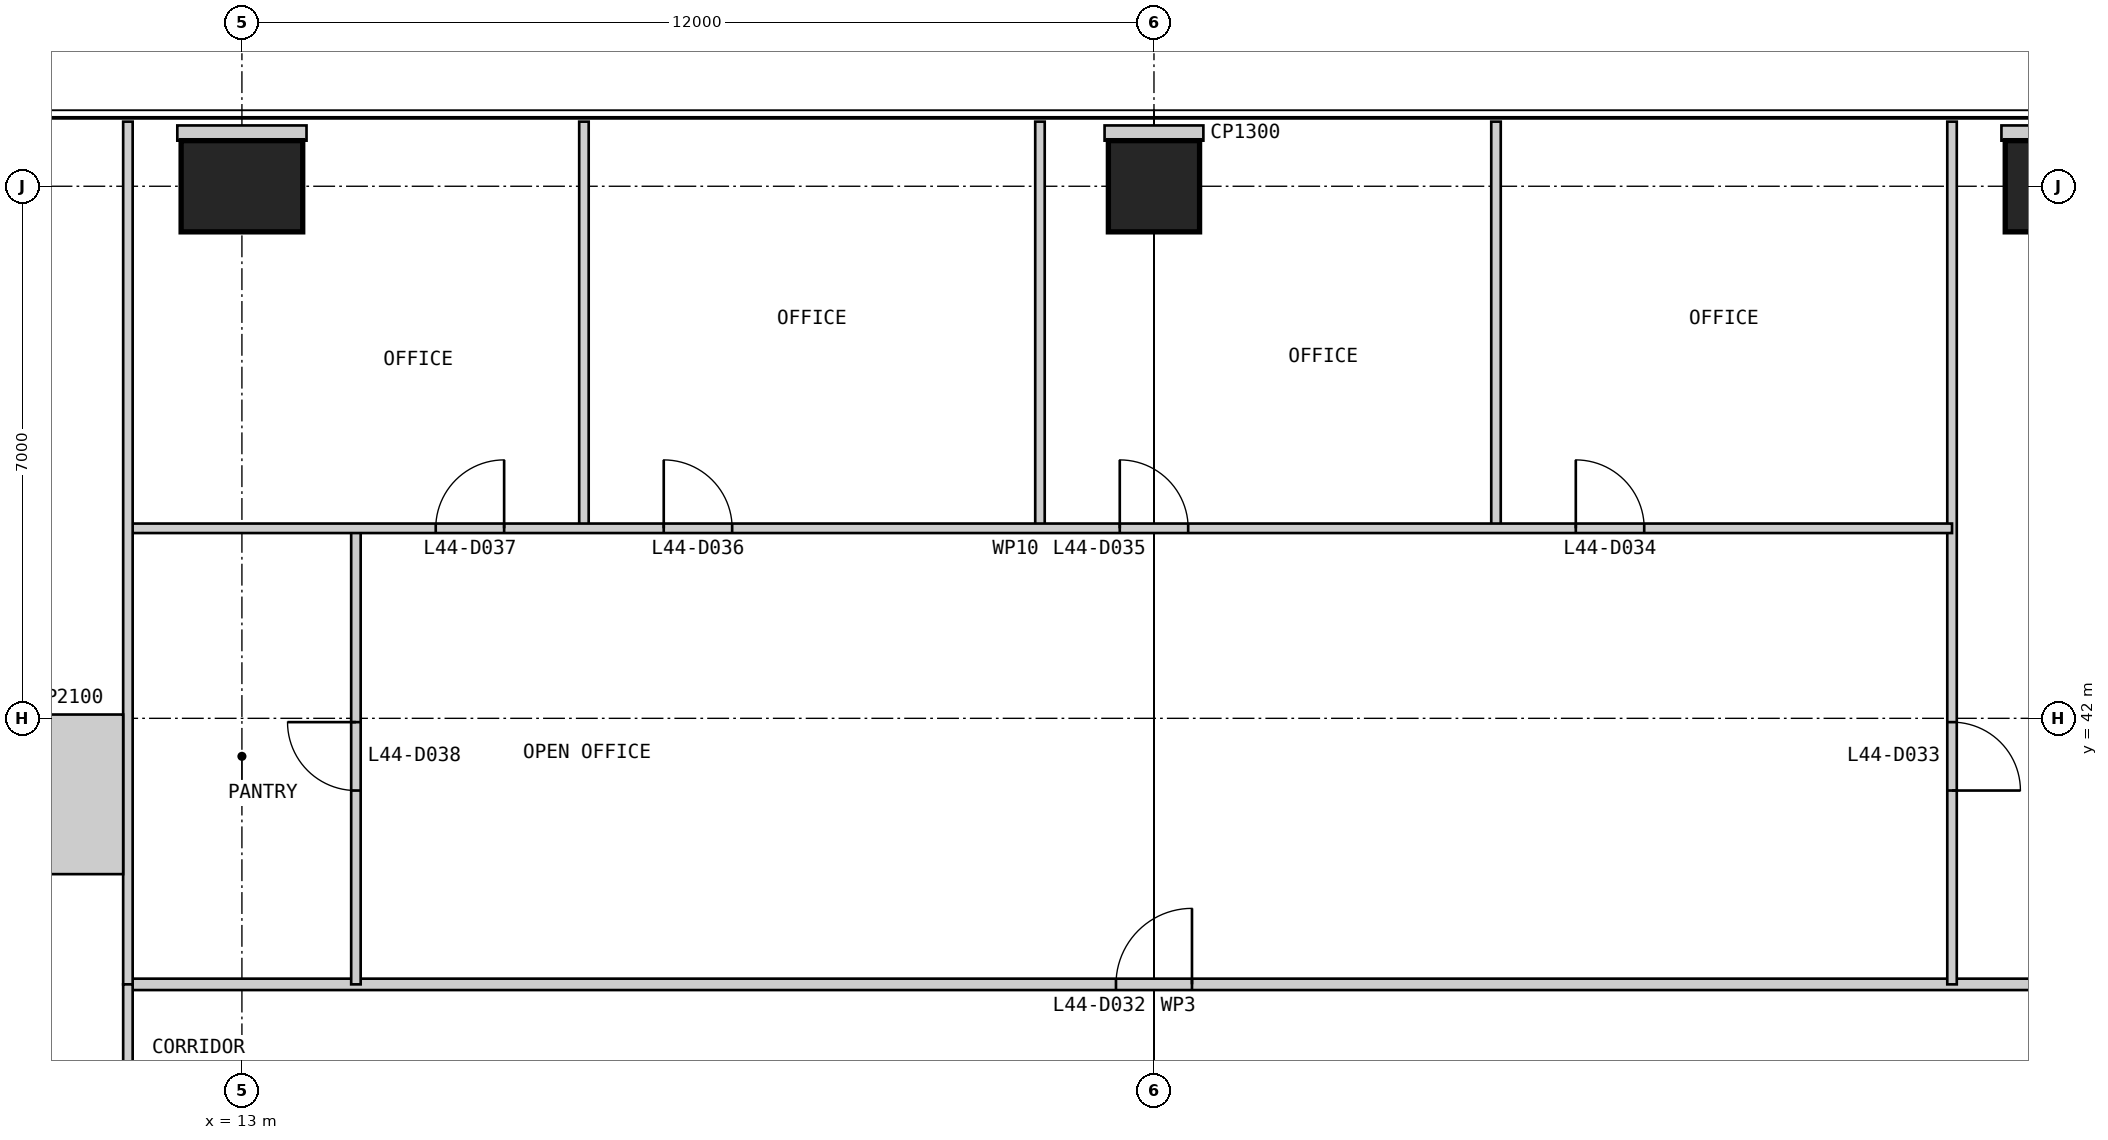
"""IFC4 building model, lengths in metres.
Left out: names, types, materials, properties, quantities, classifications, styles, units other than length and angle.
Written with IfcOpenShell. Run it as: python <this file> out.ifc"""

import sys

from ifc_helpers import new_model, si_unit, direction, frame, frame_2d, origin, origin_2d, place, context, subcontext, project, spatial, rectangle, extrude, element, fill, save


model = new_model("IFC4")
c1 = context("Model", 3, precision=1e-05, world=origin(), true_north=direction((0.0, 1.0)))
c2 = subcontext(c1, "Body", "Model", "MODEL_VIEW")
j1 = project(units=[si_unit("LENGTHUNIT", "METRE"), si_unit("PLANEANGLEUNIT", "RADIAN")], contexts=[c1])
p1 = place(None, origin())
s1 = spatial("IfcSite", under=j1, at=p1, CompositionType="ELEMENT")
p2 = place(p1, origin())
s2 = spatial("IfcBuilding", under=s1, at=p2, CompositionType="ELEMENT")
p3 = place(p2, frame((0.0, 0.0, 189.8)))
s3 = spatial("IfcBuildingStorey", under=s2, at=p3, CompositionType="ELEMENT", Elevation=189.8)
p4 = place(p3, frame((37.0, 49.0, 0.0), z_axis=(0.0, 0.0, 1.0), x_axis=(1.0, 0.0, 0.0)))
e1 = element("IfcColumn", 1, at=p4, inside=s3, PredefinedType="COLUMN", context=c2, shape_type="SweptSolid", body=[
    extrude(rectangle(XDim=1.6, YDim=1.2, at=origin_2d()), origin(), (0.0, 0.0, 1.0), 4.0),
])
p5 = place(p3, frame((25.0, 49.0, 0.0), z_axis=(0.0, 0.0, 1.0), x_axis=(1.0, 0.0, 0.0)))
e2 = element("IfcColumn", 2, at=p5, inside=s3, PredefinedType="COLUMN", context=c2, shape_type="SweptSolid", body=[
    extrude(rectangle(XDim=1.2, YDim=1.2, at=origin_2d()), origin(), (0.0, 0.0, 1.0), 4.0),
])
p6 = place(p3, frame((13.0, 49.0, 0.0), z_axis=(0.0, 0.0, 1.0), x_axis=(1.0, 0.0, 0.0)))
e3 = element("IfcColumn", 3, at=p6, inside=s3, PredefinedType="COLUMN", context=c2, shape_type="SweptSolid", body=[
    extrude(rectangle(XDim=1.6, YDim=1.2, at=origin_2d()), origin(), (0.0, 0.0, 1.0), 4.0),
])
p7 = place(p3, frame((38.5, 38.5, 0.0), z_axis=(0.0, 0.0, 1.0), x_axis=(-1.0, 0.0, 0.0)))
e4 = element("IfcWall", 4, at=p7, inside=s3, PredefinedType="PARTITIONING", context=c2, shape_type="SweptSolid", body=[
    extrude(rectangle(XDim=27.0, YDim=0.15, at=frame_2d((13.5, 0.0))), origin(), (0.0, 0.0, 1.0), 3.85),
])
p8 = place(p7, frame((13.0, 0.0, 0.0)))
e5 = element("IfcOpeningElement", 5, at=p8, cuts=e4, PredefinedType="OPENING", context=c2, shape_type="SweptSolid", body=[
    extrude(rectangle(XDim=1.0, YDim=2.2, at=frame_2d((0.5, 1.1))), frame((0.0, 0.085, 0.0), z_axis=(0.0, -1.0, 0.0), x_axis=(1.0, 0.0, 0.0)), (0.0, 0.0, 1.0), 0.17),
])
p9 = place(p3, frame((35.5, 49.85, 0.0), z_axis=(0.0, 0.0, 1.0), x_axis=(0.0, -1.0, 0.0)))
e6 = element("IfcWall", 6, at=p9, inside=s3, PredefinedType="PARTITIONING", context=c2, shape_type="SweptSolid", body=[
    extrude(rectangle(XDim=11.35, YDim=0.125, at=frame_2d((5.675, 0.0))), origin(), (0.0, 0.0, 1.0), 3.85),
])
p10 = place(p9, frame((7.9, 0.0, 0.0)))
e7 = element("IfcOpeningElement", 7, at=p10, cuts=e6, PredefinedType="OPENING", context=c2, shape_type="SweptSolid", body=[
    extrude(rectangle(XDim=0.9, YDim=2.2, at=frame_2d((0.45, 1.1))), frame((0.0, 0.073, 0.0), z_axis=(0.0, -1.0, 0.0), x_axis=(1.0, 0.0, 0.0)), (0.0, 0.0, 1.0), 0.145),
])
for number, where, z_axis, x_axis in (
    (8, (29.5, 49.85, 0.0), (0.0, 0.0, 1.0), (0.0, -1.0, 0.0)),
    (9, (23.5, 49.85, 0.0), (0.0, 0.0, 1.0), (0.0, -1.0, 0.0)),
    (10, (17.5, 49.85, 0.0), (0.0, 0.0, 1.0), (0.0, -1.0, 0.0)),
):
    element("IfcWall", number, at=place(p3, frame(where, z_axis=z_axis, x_axis=x_axis)), inside=s3, PredefinedType="PARTITIONING", context=c2, shape_type="SweptSolid", body=[
        extrude(rectangle(XDim=5.35, YDim=0.125, at=frame_2d((2.675, 0.0))), origin(), (0.0, 0.0, 1.0), 3.85),
    ])
p11 = place(p3, frame((14.5, 44.5, 0.0), z_axis=(0.0, 0.0, 1.0), x_axis=(0.0, -1.0, 0.0)))
e11 = element("IfcWall", 11, at=p11, inside=s3, PredefinedType="PARTITIONING", context=c2, shape_type="SweptSolid", body=[
    extrude(rectangle(XDim=6.0, YDim=0.125, at=frame_2d((3.0, 0.0))), origin(), (0.0, 0.0, 1.0), 3.85),
])
p12 = place(p11, frame((2.55, 0.0, 0.0)))
e12 = element("IfcOpeningElement", 12, at=p12, cuts=e11, PredefinedType="OPENING", context=c2, shape_type="SweptSolid", body=[
    extrude(rectangle(XDim=0.9, YDim=2.2, at=frame_2d((0.45, 1.1))), frame((0.0, 0.073, 0.0), z_axis=(0.0, -1.0, 0.0), x_axis=(1.0, 0.0, 0.0)), (0.0, 0.0, 1.0), 0.145),
])
p13 = place(p3, frame((35.5, 44.5, 0.0), z_axis=(0.0, 0.0, 1.0), x_axis=(-1.0, 0.0, 0.0)))
e13 = element("IfcWall", 13, at=p13, inside=s3, PredefinedType="PARTITIONING", context=c2, shape_type="SweptSolid", body=[
    extrude(rectangle(XDim=24.0, YDim=0.125, at=frame_2d((12.0, 0.0))), origin(), (0.0, 0.0, 1.0), 3.85),
])
p14 = place(p13, frame((4.05, 0.0, 0.0)))
e14 = element("IfcOpeningElement", 14, at=p14, cuts=e13, PredefinedType="OPENING", context=c2, shape_type="SweptSolid", body=[
    extrude(rectangle(XDim=0.9, YDim=2.2, at=frame_2d((0.45, 1.1))), frame((0.0, 0.073, 0.0), z_axis=(0.0, -1.0, 0.0), x_axis=(1.0, 0.0, 0.0)), (0.0, 0.0, 1.0), 0.145),
])
p15 = place(p13, frame((10.05, 0.0, 0.0)))
e15 = element("IfcOpeningElement", 15, at=p15, cuts=e13, PredefinedType="OPENING", context=c2, shape_type="SweptSolid", body=[
    extrude(rectangle(XDim=0.9, YDim=2.2, at=frame_2d((0.45, 1.1))), frame((0.0, 0.073, 0.0), z_axis=(0.0, -1.0, 0.0), x_axis=(1.0, 0.0, 0.0)), (0.0, 0.0, 1.0), 0.145),
])
p16 = place(p13, frame((16.05, 0.0, 0.0)))
e16 = element("IfcOpeningElement", 16, at=p16, cuts=e13, PredefinedType="OPENING", context=c2, shape_type="SweptSolid", body=[
    extrude(rectangle(XDim=0.9, YDim=2.2, at=frame_2d((0.45, 1.1))), frame((0.0, 0.073, 0.0), z_axis=(0.0, -1.0, 0.0), x_axis=(1.0, 0.0, 0.0)), (0.0, 0.0, 1.0), 0.145),
])
p17 = place(p13, frame((19.05, 0.0, 0.0)))
e17 = element("IfcOpeningElement", 17, at=p17, cuts=e13, PredefinedType="OPENING", context=c2, shape_type="SweptSolid", body=[
    extrude(rectangle(XDim=0.9, YDim=2.2, at=frame_2d((0.45, 1.1))), frame((0.0, 0.073, 0.0), z_axis=(0.0, -1.0, 0.0), x_axis=(1.0, 0.0, 0.0)), (0.0, 0.0, 1.0), 0.145),
])
p18 = place(p3, frame((11.5, 49.85, 0.0), z_axis=(0.0, 0.0, 1.0), x_axis=(0.0, -1.0, 0.0)))
e18 = element("IfcWall", 18, at=p18, inside=s3, PredefinedType="PARTITIONING", context=c2, shape_type="SweptSolid", body=[
    extrude(rectangle(XDim=11.35, YDim=0.125, at=frame_2d((5.675, 0.0))), origin(), (0.0, 0.0, 1.0), 3.85),
])
p19 = place(p3, frame((11.5, 38.5, 0.0), z_axis=(0.0, 0.0, 1.0), x_axis=(0.0, -1.0, 0.0)))
e19 = element("IfcWall", 19, at=p19, inside=s3, PredefinedType="PARTITIONING", context=c2, shape_type="SweptSolid", body=[
    extrude(rectangle(XDim=3.0, YDim=0.125, at=frame_2d((1.5, 0.0))), origin(), (0.0, 0.0, 1.0), 3.85),
])
p20 = place(p3, frame((37.0, 49.8, 0.0), z_axis=(0.0, 0.0, 1.0), x_axis=(0.0, -1.0, 0.0)))
e20 = element("IfcWall", 20, at=p20, inside=s3, PredefinedType="PARTITIONING", context=c2, shape_type="SweptSolid", body=[
    extrude(rectangle(XDim=0.2, YDim=1.7, at=frame_2d((0.1, 0.0))), origin(), (0.0, 0.0, 1.0), 3.85),
])
p21 = place(p3, frame((25.0, 49.8, 0.0), z_axis=(0.0, 0.0, 1.0), x_axis=(0.0, -1.0, 0.0)))
e21 = element("IfcWall", 21, at=p21, inside=s3, PredefinedType="PARTITIONING", context=c2, shape_type="SweptSolid", body=[
    extrude(rectangle(XDim=0.2, YDim=1.3, at=frame_2d((0.1, 0.0))), origin(), (0.0, 0.0, 1.0), 3.85),
])
p22 = place(p3, frame((13.0, 49.8, 0.0), z_axis=(0.0, 0.0, 1.0), x_axis=(0.0, -1.0, 0.0)))
e22 = element("IfcWall", 22, at=p22, inside=s3, PredefinedType="PARTITIONING", context=c2, shape_type="SweptSolid", body=[
    extrude(rectangle(XDim=0.2, YDim=1.7, at=frame_2d((0.1, 0.0))), origin(), (0.0, 0.0, 1.0), 3.85),
])
p23 = place(p3, frame((11.438, 41.0, 0.0), z_axis=(0.0, 0.0, 1.0), x_axis=(-1.0, 0.0, 0.0)))
e23 = element("IfcWall", 23, at=p23, inside=s3, PredefinedType="PARTITIONING", context=c2, shape_type="SweptSolid", body=[
    extrude(rectangle(XDim=1.438, YDim=2.1, at=frame_2d((0.719, 0.0))), origin(), (0.0, 0.0, 1.0), 3.85),
])
p24 = place(p8, frame((1.0, 0.0, 0.0), z_axis=(0.0, 0.0, 1.0), x_axis=(-1.0, 0.0, 0.0)))
e24 = element("IfcDoor", 24, at=p24, inside=s3, OperationType="SINGLE_SWING_RIGHT", PredefinedType="DOOR", context=c2, shape_type="SweptSolid", body=[
    extrude(rectangle(XDim=1.0, YDim=2.2, at=frame_2d((0.5, 1.1))), frame((0.0, 0.025, 0.0), z_axis=(0.0, -1.0, 0.0), x_axis=(1.0, 0.0, 0.0)), (0.0, 0.0, 1.0), 0.05),
])
fill(e5, e24)
p25 = place(p10, origin())
e25 = element("IfcDoor", 25, at=p25, inside=s3, OperationType="SINGLE_SWING_RIGHT", PredefinedType="DOOR", context=c2, shape_type="SweptSolid", body=[
    extrude(rectangle(XDim=0.9, YDim=2.2, at=frame_2d((0.45, 1.1))), frame((0.0, 0.025, 0.0), z_axis=(0.0, -1.0, 0.0), x_axis=(1.0, 0.0, 0.0)), (0.0, 0.0, 1.0), 0.05),
])
fill(e7, e25)
p26 = place(p14, frame((0.9, 0.0, 0.0), z_axis=(0.0, 0.0, 1.0), x_axis=(-1.0, 0.0, 0.0)))
e26 = element("IfcDoor", 26, at=p26, inside=s3, OperationType="SINGLE_SWING_LEFT", PredefinedType="DOOR", context=c2, shape_type="SweptSolid", body=[
    extrude(rectangle(XDim=0.9, YDim=2.2, at=frame_2d((0.45, 1.1))), frame((0.0, 0.025, 0.0), z_axis=(0.0, -1.0, 0.0), x_axis=(1.0, 0.0, 0.0)), (0.0, 0.0, 1.0), 0.05),
])
fill(e14, e26)
p27 = place(p15, frame((0.9, 0.0, 0.0), z_axis=(0.0, 0.0, 1.0), x_axis=(-1.0, 0.0, 0.0)))
e27 = element("IfcDoor", 27, at=p27, inside=s3, OperationType="SINGLE_SWING_LEFT", PredefinedType="DOOR", context=c2, shape_type="SweptSolid", body=[
    extrude(rectangle(XDim=0.9, YDim=2.2, at=frame_2d((0.45, 1.1))), frame((0.0, 0.025, 0.0), z_axis=(0.0, -1.0, 0.0), x_axis=(1.0, 0.0, 0.0)), (0.0, 0.0, 1.0), 0.05),
])
fill(e15, e27)
p28 = place(p16, frame((0.9, 0.0, 0.0), z_axis=(0.0, 0.0, 1.0), x_axis=(-1.0, 0.0, 0.0)))
e28 = element("IfcDoor", 28, at=p28, inside=s3, OperationType="SINGLE_SWING_LEFT", PredefinedType="DOOR", context=c2, shape_type="SweptSolid", body=[
    extrude(rectangle(XDim=0.9, YDim=2.2, at=frame_2d((0.45, 1.1))), frame((0.0, 0.025, 0.0), z_axis=(0.0, -1.0, 0.0), x_axis=(1.0, 0.0, 0.0)), (0.0, 0.0, 1.0), 0.05),
])
fill(e16, e28)
p29 = place(p17, frame((0.9, 0.0, 0.0), z_axis=(0.0, 0.0, 1.0), x_axis=(-1.0, 0.0, 0.0)))
e29 = element("IfcDoor", 29, at=p29, inside=s3, OperationType="SINGLE_SWING_RIGHT", PredefinedType="DOOR", context=c2, shape_type="SweptSolid", body=[
    extrude(rectangle(XDim=0.9, YDim=2.2, at=frame_2d((0.45, 1.1))), frame((0.0, 0.025, 0.0), z_axis=(0.0, -1.0, 0.0), x_axis=(1.0, 0.0, 0.0)), (0.0, 0.0, 1.0), 0.05),
])
fill(e17, e29)
p30 = place(p12, frame((0.9, 0.0, 0.0), z_axis=(0.0, 0.0, 1.0), x_axis=(-1.0, 0.0, 0.0)))
e30 = element("IfcDoor", 30, at=p30, inside=s3, OperationType="SINGLE_SWING_RIGHT", PredefinedType="DOOR", context=c2, shape_type="SweptSolid", body=[
    extrude(rectangle(XDim=0.9, YDim=2.2, at=frame_2d((0.45, 1.1))), frame((0.0, 0.025, 0.0), z_axis=(0.0, -1.0, 0.0), x_axis=(1.0, 0.0, 0.0)), (0.0, 0.0, 1.0), 0.05),
])
fill(e12, e30)
save(model, sys.argv[1])
